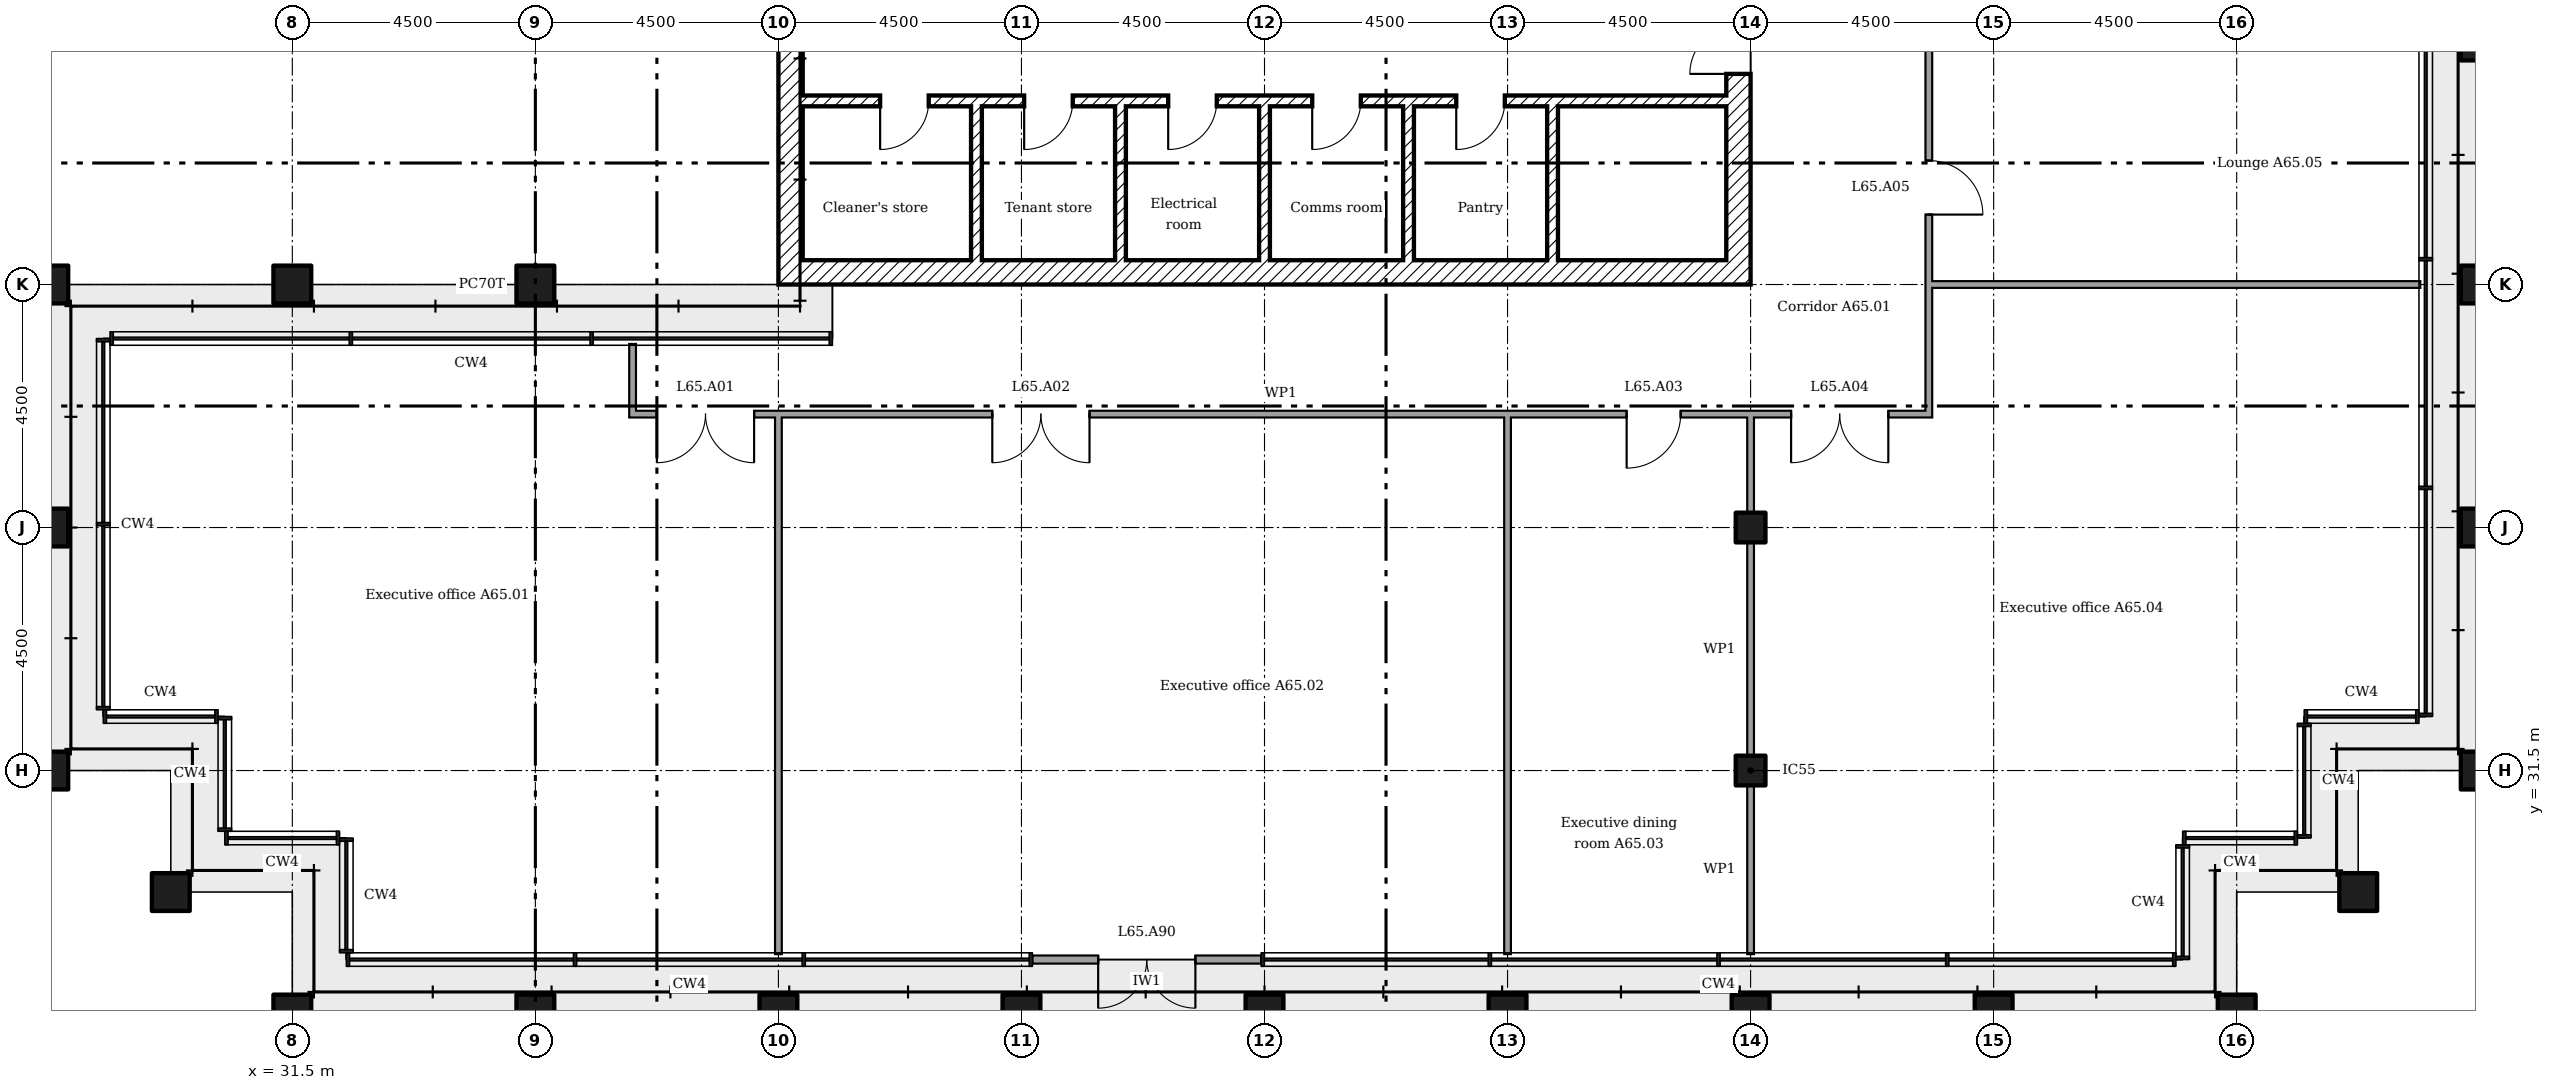
"""IFC4 building model, lengths in metres.
Left out: names, types, materials, properties, quantities, classifications, styles, units other than length and angle.
Written with IfcOpenShell. Run it as: python <this file> out.ifc"""

import sys

from ifc_helpers import new_model, si_unit, direction, frame, frame_2d, origin, origin_2d, place, context, subcontext, project, spatial, rectangle, extrude, element, fill, save


model = new_model("IFC4")
c1 = context("Model", 3, precision=1e-05, world=origin(), true_north=direction((0.0, 1.0)))
c2 = subcontext(c1, "Body", "Model", "MODEL_VIEW")
j1 = project(units=[si_unit("LENGTHUNIT", "METRE"), si_unit("PLANEANGLEUNIT", "RADIAN")], contexts=[c1])
p1 = place(None, origin())
s1 = spatial("IfcSite", under=j1, at=p1, CompositionType="ELEMENT")
p2 = place(p1, origin())
s2 = spatial("IfcBuilding", under=s1, at=p2, CompositionType="ELEMENT")
p3 = place(p2, frame((0.0, 0.0, 255.2)))
s3 = spatial("IfcBuildingStorey", under=s2, at=p3, CompositionType="ELEMENT", Elevation=255.2)
for number, where in (
    (1, (31.5, 27.0, 0.0)),
    (2, (36.0, 27.0, 0.0)),
    (3, (40.5, 27.0, 0.0)),
    (4, (45.0, 27.0, 0.0)),
    (5, (49.5, 27.0, 0.0)),
    (6, (54.0, 27.0, 0.0)),
    (7, (58.5, 27.0, 0.0)),
    (8, (63.0, 27.0, 0.0)),
    (9, (67.5, 27.0, 0.0)),
    (10, (69.75, 29.25, 0.0)),
    (11, (72.0, 31.5, 0.0)),
    (12, (72.0, 36.0, 0.0)),
    (13, (72.0, 40.5, 0.0)),
    (14, (72.0, 45.0, 0.0)),
    (15, (36.0, 40.5, 0.0)),
    (16, (31.5, 40.5, 0.0)),
    (17, (27.0, 40.5, 0.0)),
    (18, (27.0, 36.0, 0.0)),
    (19, (27.0, 31.5, 0.0)),
    (20, (29.25, 29.25, 0.0)),
):
    element("IfcColumn", number, at=place(p3, frame(where)), inside=s3, PredefinedType="COLUMN", context=c2, shape_type="SweptSolid", body=[
        extrude(rectangle(XDim=0.7, YDim=0.7, at=origin_2d()), origin(), (0.0, 0.0, 1.0), 4.2),
    ])
for number, where in (
    (21, (58.5, 31.5, 0.0)),
    (22, (58.5, 36.0, 0.0)),
):
    element("IfcColumn", number, at=place(p3, frame(where)), inside=s3, PredefinedType="COLUMN", context=c2, shape_type="SweptSolid", body=[
        extrude(rectangle(XDim=0.55, YDim=0.55, at=origin_2d()), origin(), (0.0, 0.0, 1.0), 4.2),
    ])
p4 = place(p3, frame((45.203, 28.0, 0.0)))
e23 = element("IfcWall", 23, at=p4, inside=s3, PredefinedType="SOLIDWALL", context=c2, shape_type="SweptSolid", body=[
    extrude(rectangle(XDim=4.234, YDim=0.15, at=frame_2d((2.117, 0.0))), origin(), (0.0, 0.0, 1.0), 4.025),
])
p5 = place(p4, frame((1.217, 0.0, 0.0)))
e24 = element("IfcOpeningElement", 24, at=p5, cuts=e23, PredefinedType="OPENING", context=c2, shape_type="SweptSolid", body=[
    extrude(rectangle(XDim=1.8, YDim=2.4, at=frame_2d((0.9, 1.2))), frame((0.0, 0.085, 0.0), z_axis=(0.0, -1.0, 0.0), x_axis=(1.0, 0.0, 0.0)), (0.0, 0.0, 1.0), 0.17),
])
p6 = place(p3, frame((58.275, 40.5, 0.0), z_axis=(0.0, 0.0, 1.0), x_axis=(0.0, 1.0, 0.0)))
e25 = element("IfcWall", 25, at=p6, inside=s3, PredefinedType="SHEAR", context=c2, shape_type="SweptSolid", body=[
    extrude(rectangle(XDim=18.0, YDim=0.45, at=frame_2d((9.0, 0.0))), origin(), (0.0, 0.0, 1.0), 3.78),
])
p7 = place(p6, frame((13.15, 0.0, 0.0)))
e26 = element("IfcOpeningElement", 26, at=p7, cuts=e25, PredefinedType="OPENING", context=c2, shape_type="SweptSolid", body=[
    extrude(rectangle(XDim=1.2, YDim=2.1, at=frame_2d((0.6, 1.05))), frame((0.0, 0.235, 0.0), z_axis=(0.0, -1.0, 0.0), x_axis=(1.0, 0.0, 0.0)), (0.0, 0.0, 1.0), 0.47),
])
p8 = place(p6, frame((3.9, 0.0, 0.0)))
e27 = element("IfcOpeningElement", 27, at=p8, cuts=e25, PredefinedType="OPENING", context=c2, shape_type="SweptSolid", body=[
    extrude(rectangle(XDim=1.8, YDim=2.1, at=frame_2d((0.9, 1.05))), frame((0.0, 0.235, 0.0), z_axis=(0.0, -1.0, 0.0), x_axis=(1.0, 0.0, 0.0)), (0.0, 0.0, 1.0), 0.47),
])
p9 = place(p6, frame((11.525, 0.0, 0.0)))
e28 = element("IfcOpeningElement", 28, at=p9, cuts=e25, PredefinedType="OPENING", context=c2, shape_type="SweptSolid", body=[
    extrude(rectangle(XDim=1.0, YDim=2.1, at=frame_2d((0.5, 1.05))), frame((0.0, 0.235, 0.0), z_axis=(0.0, -1.0, 0.0), x_axis=(1.0, 0.0, 0.0)), (0.0, 0.0, 1.0), 0.47),
])
p10 = place(p3, frame((40.5, 40.725, 0.0)))
e29 = element("IfcWall", 29, at=p10, inside=s3, PredefinedType="SHEAR", context=c2, shape_type="SweptSolid", body=[
    extrude(rectangle(XDim=17.55, YDim=0.45, at=frame_2d((8.775, 0.0))), origin(), (0.0, 0.0, 1.0), 3.78),
])
p11 = place(p3, frame((40.725, 40.95, 0.0), z_axis=(0.0, 0.0, 1.0), x_axis=(0.0, 1.0, 0.0)))
e30 = element("IfcWall", 30, at=p11, inside=s3, PredefinedType="SHEAR", context=c2, shape_type="SweptSolid", body=[
    extrude(rectangle(XDim=17.1, YDim=0.45, at=frame_2d((8.55, 0.0))), origin(), (0.0, 0.0, 1.0), 3.78),
])
for number, where, z_axis, x_axis in (
    (31, (44.167, 40.95, 0.0), (0.0, 0.0, 1.0), (0.0, 1.0, 0.0)),
    (32, (46.833, 40.95, 0.0), (0.0, 0.0, 1.0), (0.0, 1.0, 0.0)),
    (33, (49.5, 40.95, 0.0), (0.0, 0.0, 1.0), (0.0, 1.0, 0.0)),
    (34, (52.167, 40.95, 0.0), (0.0, 0.0, 1.0), (0.0, 1.0, 0.0)),
    (35, (54.833, 40.95, 0.0), (0.0, 0.0, 1.0), (0.0, 1.0, 0.0)),
):
    element("IfcWall", number, at=place(p3, frame(where, z_axis=z_axis, x_axis=x_axis)), inside=s3, PredefinedType="SHEAR", context=c2, shape_type="SweptSolid", body=[
        extrude(rectangle(XDim=2.85, YDim=0.2, at=frame_2d((1.425, 0.0))), origin(), (0.0, 0.0, 1.0), 3.78),
    ])
p12 = place(p3, frame((40.95, 43.9, 0.0)))
e36 = element("IfcWall", 36, at=p12, inside=s3, PredefinedType="SHEAR", context=c2, shape_type="SweptSolid", body=[
    extrude(rectangle(XDim=17.1, YDim=0.2, at=frame_2d((8.55, 0.0))), origin(), (0.0, 0.0, 1.0), 3.78),
])
p13 = place(p12, frame((1.433, 0.0, 0.0)))
e37 = element("IfcOpeningElement", 37, at=p13, cuts=e36, PredefinedType="OPENING", context=c2, shape_type="SweptSolid", body=[
    extrude(rectangle(XDim=0.9, YDim=2.1, at=frame_2d((0.45, 1.05))), frame((0.0, 0.11, 0.0), z_axis=(0.0, -1.0, 0.0), x_axis=(1.0, 0.0, 0.0)), (0.0, 0.0, 1.0), 0.22),
])
p14 = place(p12, frame((4.1, 0.0, 0.0)))
e38 = element("IfcOpeningElement", 38, at=p14, cuts=e36, PredefinedType="OPENING", context=c2, shape_type="SweptSolid", body=[
    extrude(rectangle(XDim=0.9, YDim=2.1, at=frame_2d((0.45, 1.05))), frame((0.0, 0.11, 0.0), z_axis=(0.0, -1.0, 0.0), x_axis=(1.0, 0.0, 0.0)), (0.0, 0.0, 1.0), 0.22),
])
p15 = place(p12, frame((6.767, 0.0, 0.0)))
e39 = element("IfcOpeningElement", 39, at=p15, cuts=e36, PredefinedType="OPENING", context=c2, shape_type="SweptSolid", body=[
    extrude(rectangle(XDim=0.9, YDim=2.1, at=frame_2d((0.45, 1.05))), frame((0.0, 0.11, 0.0), z_axis=(0.0, -1.0, 0.0), x_axis=(1.0, 0.0, 0.0)), (0.0, 0.0, 1.0), 0.22),
])
p16 = place(p12, frame((9.433, 0.0, 0.0)))
e40 = element("IfcOpeningElement", 40, at=p16, cuts=e36, PredefinedType="OPENING", context=c2, shape_type="SweptSolid", body=[
    extrude(rectangle(XDim=0.9, YDim=2.1, at=frame_2d((0.45, 1.05))), frame((0.0, 0.11, 0.0), z_axis=(0.0, -1.0, 0.0), x_axis=(1.0, 0.0, 0.0)), (0.0, 0.0, 1.0), 0.22),
])
p17 = place(p12, frame((12.1, 0.0, 0.0)))
e41 = element("IfcOpeningElement", 41, at=p17, cuts=e36, PredefinedType="OPENING", context=c2, shape_type="SweptSolid", body=[
    extrude(rectangle(XDim=0.9, YDim=2.1, at=frame_2d((0.45, 1.05))), frame((0.0, 0.11, 0.0), z_axis=(0.0, -1.0, 0.0), x_axis=(1.0, 0.0, 0.0)), (0.0, 0.0, 1.0), 0.22),
])
p18 = place(p3, frame((37.738, 38.1, 0.0)))
e42 = element("IfcWall", 42, at=p18, inside=s3, PredefinedType="PARTITIONING", context=c2, shape_type="SweptSolid", body=[
    extrude(rectangle(XDim=24.125, YDim=0.125, at=frame_2d((12.062, 0.0))), origin(), (0.0, 0.0, 1.0), 4.025),
])
p19 = place(p18, frame((0.512, 0.0, 0.0)))
e43 = element("IfcOpeningElement", 43, at=p19, cuts=e42, PredefinedType="OPENING", context=c2, shape_type="SweptSolid", body=[
    extrude(rectangle(XDim=1.8, YDim=2.1, at=frame_2d((0.9, 1.05))), frame((0.0, 0.073, 0.0), z_axis=(0.0, -1.0, 0.0), x_axis=(1.0, 0.0, 0.0)), (0.0, 0.0, 1.0), 0.145),
])
p20 = place(p18, frame((6.722, 0.0, 0.0)))
e44 = element("IfcOpeningElement", 44, at=p20, cuts=e42, PredefinedType="OPENING", context=c2, shape_type="SweptSolid", body=[
    extrude(rectangle(XDim=1.8, YDim=2.1, at=frame_2d((0.9, 1.05))), frame((0.0, 0.073, 0.0), z_axis=(0.0, -1.0, 0.0), x_axis=(1.0, 0.0, 0.0)), (0.0, 0.0, 1.0), 0.145),
])
p21 = place(p18, frame((18.468, 0.0, 0.0)))
e45 = element("IfcOpeningElement", 45, at=p21, cuts=e42, PredefinedType="OPENING", context=c2, shape_type="SweptSolid", body=[
    extrude(rectangle(XDim=1.0, YDim=2.1, at=frame_2d((0.5, 1.05))), frame((0.0, 0.073, 0.0), z_axis=(0.0, -1.0, 0.0), x_axis=(1.0, 0.0, 0.0)), (0.0, 0.0, 1.0), 0.145),
])
p22 = place(p18, frame((21.512, 0.0, 0.0)))
e46 = element("IfcOpeningElement", 46, at=p22, cuts=e42, PredefinedType="OPENING", context=c2, shape_type="SweptSolid", body=[
    extrude(rectangle(XDim=1.8, YDim=2.1, at=frame_2d((0.9, 1.05))), frame((0.0, 0.073, 0.0), z_axis=(0.0, -1.0, 0.0), x_axis=(1.0, 0.0, 0.0)), (0.0, 0.0, 1.0), 0.145),
])
p23 = place(p3, frame((61.8, 40.5, 0.0)))
e47 = element("IfcWall", 47, at=p23, inside=s3, PredefinedType="PARTITIONING", context=c2, shape_type="SweptSolid", body=[
    extrude(rectangle(XDim=9.1, YDim=0.125, at=frame_2d((4.55, 0.0))), origin(), (0.0, 0.0, 1.0), 3.341),
])
p24 = place(p3, frame((37.8, 38.163, 0.0), z_axis=(0.0, 0.0, 1.0), x_axis=(0.0, 1.0, 0.0)))
e48 = element("IfcWall", 48, at=p24, inside=s3, PredefinedType="PARTITIONING", context=c2, shape_type="SweptSolid", body=[
    extrude(rectangle(XDim=1.237, YDim=0.125, at=frame_2d((0.619, 0.0))), origin(), (0.0, 0.0, 1.0), 4.025),
])
for number, where, z_axis, x_axis in (
    (49, (40.5, 28.1, 0.0), (0.0, 0.0, 1.0), (0.0, 1.0, 0.0)),
    (50, (54.0, 28.1, 0.0), (0.0, 0.0, 1.0), (0.0, 1.0, 0.0)),
):
    element("IfcWall", number, at=place(p3, frame(where, z_axis=z_axis, x_axis=x_axis)), inside=s3, PredefinedType="PARTITIONING", context=c2, shape_type="SweptSolid", body=[
        extrude(rectangle(XDim=10.0, YDim=0.125, at=frame_2d((5.0, 0.0))), origin(), (0.0, 0.0, 1.0), 3.341),
    ])
p25 = place(p3, frame((58.5, 28.1, 0.0), z_axis=(0.0, 0.0, 1.0), x_axis=(0.0, 1.0, 0.0)))
e51 = element("IfcWall", 51, at=p25, inside=s3, PredefinedType="PARTITIONING", context=c2, shape_type="SweptSolid", body=[
    extrude(rectangle(XDim=3.125, YDim=0.125, at=frame_2d((1.562, 0.0))), origin(), (0.0, 0.0, 1.0), 3.251),
])
p26 = place(p3, frame((58.5, 31.775, 0.0), z_axis=(0.0, 0.0, 1.0), x_axis=(0.0, 1.0, 0.0)))
e52 = element("IfcWall", 52, at=p26, inside=s3, PredefinedType="PARTITIONING", context=c2, shape_type="SweptSolid", body=[
    extrude(rectangle(XDim=3.95, YDim=0.125, at=frame_2d((1.975, 0.0))), origin(), (0.0, 0.0, 1.0), 3.251),
])
p27 = place(p3, frame((58.5, 36.275, 0.0), z_axis=(0.0, 0.0, 1.0), x_axis=(0.0, 1.0, 0.0)))
e53 = element("IfcWall", 53, at=p27, inside=s3, PredefinedType="PARTITIONING", context=c2, shape_type="SweptSolid", body=[
    extrude(rectangle(XDim=1.825, YDim=0.125, at=frame_2d((0.913, 0.0))), origin(), (0.0, 0.0, 1.0), 3.251),
])
p28 = place(p3, frame((61.8, 38.163, 0.0), z_axis=(0.0, 0.0, 1.0), x_axis=(0.0, 1.0, 0.0)))
e54 = element("IfcWall", 54, at=p28, inside=s3, PredefinedType="PARTITIONING", context=c2, shape_type="SweptSolid", body=[
    extrude(rectangle(XDim=22.075, YDim=0.125, at=frame_2d((11.038, 0.0))), origin(), (0.0, 0.0, 1.0), 4.025),
])
p29 = place(p28, frame((3.633, 0.0, 0.0)))
e55 = element("IfcOpeningElement", 55, at=p29, cuts=e54, PredefinedType="OPENING", context=c2, shape_type="SweptSolid", body=[
    extrude(rectangle(XDim=1.0, YDim=2.1, at=frame_2d((0.5, 1.05))), frame((0.0, 0.073, 0.0), z_axis=(0.0, -1.0, 0.0), x_axis=(1.0, 0.0, 0.0)), (0.0, 0.0, 1.0), 0.145),
])
p30 = place(p28, frame((9.042, 0.0, 0.0)))
e56 = element("IfcOpeningElement", 56, at=p30, cuts=e54, PredefinedType="OPENING", context=c2, shape_type="SweptSolid", body=[
    extrude(rectangle(XDim=1.0, YDim=2.1, at=frame_2d((0.5, 1.05))), frame((0.0, 0.073, 0.0), z_axis=(0.0, -1.0, 0.0), x_axis=(1.0, 0.0, 0.0)), (0.0, 0.0, 1.0), 0.145),
])
p31 = place(p28, frame((13.087, 0.0, 0.0)))
e57 = element("IfcOpeningElement", 57, at=p31, cuts=e54, PredefinedType="OPENING", context=c2, shape_type="SweptSolid", body=[
    extrude(rectangle(XDim=1.0, YDim=2.1, at=frame_2d((0.5, 1.05))), frame((0.0, 0.073, 0.0), z_axis=(0.0, -1.0, 0.0), x_axis=(1.0, 0.0, 0.0)), (0.0, 0.0, 1.0), 0.145),
])
p32 = place(p28, frame((17.133, 0.0, 0.0)))
e58 = element("IfcOpeningElement", 58, at=p32, cuts=e54, PredefinedType="OPENING", context=c2, shape_type="SweptSolid", body=[
    extrude(rectangle(XDim=1.0, YDim=2.1, at=frame_2d((0.5, 1.05))), frame((0.0, 0.073, 0.0), z_axis=(0.0, -1.0, 0.0), x_axis=(1.0, 0.0, 0.0)), (0.0, 0.0, 1.0), 0.145),
])
p33 = place(p5, frame((1.8, 0.0, 0.0), x_axis=(-1.0, 0.0, 0.0)))
e59 = element("IfcDoor", 59, at=p33, inside=s3, OperationType="DOUBLE_DOOR_DOUBLE_SWING", PredefinedType="NOTDEFINED", context=c2, shape_type="SweptSolid", body=[
    extrude(rectangle(XDim=1.8, YDim=2.4, at=frame_2d((0.9, 1.2))), frame((0.0, 0.025, 0.0), z_axis=(0.0, -1.0, 0.0), x_axis=(1.0, 0.0, 0.0)), (0.0, 0.0, 1.0), 0.05),
])
fill(e24, e59)
p34 = place(p8, origin())
e60 = element("IfcDoor", 60, at=p34, inside=s3, OperationType="DOUBLE_DOOR_SINGLE_SWING", PredefinedType="DOOR", context=c2, shape_type="SweptSolid", body=[
    extrude(rectangle(XDim=1.8, YDim=2.1, at=frame_2d((0.9, 1.05))), frame((0.0, 0.025, 0.0), z_axis=(0.0, -1.0, 0.0), x_axis=(1.0, 0.0, 0.0)), (0.0, 0.0, 1.0), 0.05),
])
fill(e27, e60)
p35 = place(p13, frame((0.9, 0.0, 0.0), x_axis=(-1.0, 0.0, 0.0)))
e61 = element("IfcDoor", 61, at=p35, inside=s3, OperationType="SINGLE_SWING_LEFT", PredefinedType="DOOR", context=c2, shape_type="SweptSolid", body=[
    extrude(rectangle(XDim=0.9, YDim=2.1, at=frame_2d((0.45, 1.05))), frame((0.0, 0.025, 0.0), z_axis=(0.0, -1.0, 0.0), x_axis=(1.0, 0.0, 0.0)), (0.0, 0.0, 1.0), 0.05),
])
fill(e37, e61)
p36 = place(p14, frame((0.9, 0.0, 0.0), x_axis=(-1.0, 0.0, 0.0)))
e62 = element("IfcDoor", 62, at=p36, inside=s3, OperationType="SINGLE_SWING_LEFT", PredefinedType="DOOR", context=c2, shape_type="SweptSolid", body=[
    extrude(rectangle(XDim=0.9, YDim=2.1, at=frame_2d((0.45, 1.05))), frame((0.0, 0.025, 0.0), z_axis=(0.0, -1.0, 0.0), x_axis=(1.0, 0.0, 0.0)), (0.0, 0.0, 1.0), 0.05),
])
fill(e38, e62)
p37 = place(p15, frame((0.9, 0.0, 0.0), x_axis=(-1.0, 0.0, 0.0)))
e63 = element("IfcDoor", 63, at=p37, inside=s3, OperationType="SINGLE_SWING_LEFT", PredefinedType="DOOR", context=c2, shape_type="SweptSolid", body=[
    extrude(rectangle(XDim=0.9, YDim=2.1, at=frame_2d((0.45, 1.05))), frame((0.0, 0.025, 0.0), z_axis=(0.0, -1.0, 0.0), x_axis=(1.0, 0.0, 0.0)), (0.0, 0.0, 1.0), 0.05),
])
fill(e39, e63)
p38 = place(p16, frame((0.9, 0.0, 0.0), x_axis=(-1.0, 0.0, 0.0)))
e64 = element("IfcDoor", 64, at=p38, inside=s3, OperationType="SINGLE_SWING_LEFT", PredefinedType="DOOR", context=c2, shape_type="SweptSolid", body=[
    extrude(rectangle(XDim=0.9, YDim=2.1, at=frame_2d((0.45, 1.05))), frame((0.0, 0.025, 0.0), z_axis=(0.0, -1.0, 0.0), x_axis=(1.0, 0.0, 0.0)), (0.0, 0.0, 1.0), 0.05),
])
fill(e40, e64)
p39 = place(p17, frame((0.9, 0.0, 0.0), x_axis=(-1.0, 0.0, 0.0)))
e65 = element("IfcDoor", 65, at=p39, inside=s3, OperationType="SINGLE_SWING_LEFT", PredefinedType="DOOR", context=c2, shape_type="SweptSolid", body=[
    extrude(rectangle(XDim=0.9, YDim=2.1, at=frame_2d((0.45, 1.05))), frame((0.0, 0.025, 0.0), z_axis=(0.0, -1.0, 0.0), x_axis=(1.0, 0.0, 0.0)), (0.0, 0.0, 1.0), 0.05),
])
fill(e41, e65)
p40 = place(p19, frame((1.8, 0.0, 0.0), x_axis=(-1.0, 0.0, 0.0)))
e66 = element("IfcDoor", 66, at=p40, inside=s3, OperationType="DOUBLE_DOOR_SINGLE_SWING", PredefinedType="DOOR", context=c2, shape_type="SweptSolid", body=[
    extrude(rectangle(XDim=1.8, YDim=2.1, at=frame_2d((0.9, 1.05))), frame((0.0, 0.025, 0.0), z_axis=(0.0, -1.0, 0.0), x_axis=(1.0, 0.0, 0.0)), (0.0, 0.0, 1.0), 0.05),
])
fill(e43, e66)
p41 = place(p20, frame((1.8, 0.0, 0.0), x_axis=(-1.0, 0.0, 0.0)))
e67 = element("IfcDoor", 67, at=p41, inside=s3, OperationType="DOUBLE_DOOR_SINGLE_SWING", PredefinedType="DOOR", context=c2, shape_type="SweptSolid", body=[
    extrude(rectangle(XDim=1.8, YDim=2.1, at=frame_2d((0.9, 1.05))), frame((0.0, 0.025, 0.0), z_axis=(0.0, -1.0, 0.0), x_axis=(1.0, 0.0, 0.0)), (0.0, 0.0, 1.0), 0.05),
])
fill(e44, e67)
p42 = place(p21, frame((1.0, 0.0, 0.0), x_axis=(-1.0, 0.0, 0.0)))
e68 = element("IfcDoor", 68, at=p42, inside=s3, OperationType="SINGLE_SWING_LEFT", PredefinedType="DOOR", context=c2, shape_type="SweptSolid", body=[
    extrude(rectangle(XDim=1.0, YDim=2.1, at=frame_2d((0.5, 1.05))), frame((0.0, 0.025, 0.0), z_axis=(0.0, -1.0, 0.0), x_axis=(1.0, 0.0, 0.0)), (0.0, 0.0, 1.0), 0.05),
])
fill(e45, e68)
p43 = place(p22, frame((1.8, 0.0, 0.0), x_axis=(-1.0, 0.0, 0.0)))
e69 = element("IfcDoor", 69, at=p43, inside=s3, OperationType="DOUBLE_DOOR_SINGLE_SWING", PredefinedType="DOOR", context=c2, shape_type="SweptSolid", body=[
    extrude(rectangle(XDim=1.8, YDim=2.1, at=frame_2d((0.9, 1.05))), frame((0.0, 0.025, 0.0), z_axis=(0.0, -1.0, 0.0), x_axis=(1.0, 0.0, 0.0)), (0.0, 0.0, 1.0), 0.05),
])
fill(e46, e69)
p44 = place(p29, frame((1.0, 0.0, 0.0), x_axis=(-1.0, 0.0, 0.0)))
e70 = element("IfcDoor", 70, at=p44, inside=s3, OperationType="SINGLE_SWING_LEFT", PredefinedType="DOOR", context=c2, shape_type="SweptSolid", body=[
    extrude(rectangle(XDim=1.0, YDim=2.1, at=frame_2d((0.5, 1.05))), frame((0.0, 0.025, 0.0), z_axis=(0.0, -1.0, 0.0), x_axis=(1.0, 0.0, 0.0)), (0.0, 0.0, 1.0), 0.05),
])
fill(e55, e70)
save(model, sys.argv[1])
